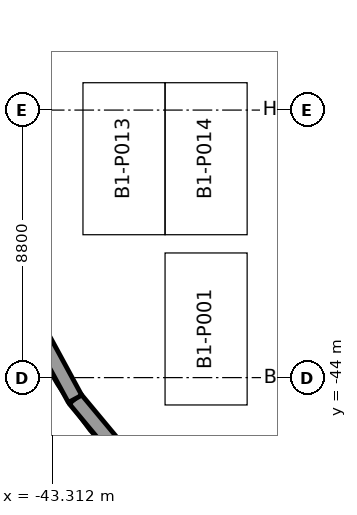
"""IFC4 building model, lengths in metres.
Left out: names, types, materials, properties, quantities, classifications, styles, units other than length and angle.
Written with IfcOpenShell. Run it as: python <this file> out.ifc"""

import sys

from ifc_helpers import new_model, si_unit, direction, frame, frame_2d, origin, place, context, subcontext, project, spatial, rectangle, extrude, element, save


model = new_model("IFC4")
c1 = context("Model", 3, precision=1e-05, world=origin(), true_north=direction((0.0, 1.0)))
c2 = subcontext(c1, "Body", "Model", "MODEL_VIEW")
j1 = project(units=[si_unit("LENGTHUNIT", "METRE"), si_unit("PLANEANGLEUNIT", "RADIAN")], contexts=[c1])
p1 = place(None, origin())
s1 = spatial("IfcSite", under=j1, at=p1, CompositionType="ELEMENT")
p2 = place(p1, origin())
s2 = spatial("IfcBuilding", under=s1, at=p2, CompositionType="ELEMENT")
p3 = place(p2, frame((0.0, 0.0, -4.5)))
s3 = spatial("IfcBuildingStorey", under=s2, at=p3, CompositionType="ELEMENT", Elevation=-4.5)
p4 = place(p3, frame((-40.853, -46.752, 0.0), z_axis=(0.0, 0.0, 1.0), x_axis=(-0.63937488944, 0.768895149388, 0.0)))
e1 = element("IfcWall", 1, at=p4, inside=s3, PredefinedType="SOLIDWALL", context=c2, shape_type="SweptSolid", body=[
    extrude(rectangle(XDim=2.671, YDim=0.5, at=frame_2d((1.335, 0.0))), origin(), (0.0, 0.0, 1.0), 4.5),
])
p5 = place(p3, frame((-42.561, -44.699, 0.0), z_axis=(0.0, 0.0, 1.0), x_axis=(-0.477048002242, 0.878877240323, 0.0)))
e2 = element("IfcWall", 2, at=p5, inside=s3, PredefinedType="SOLIDWALL", context=c2, shape_type="SweptSolid", body=[
    extrude(rectangle(XDim=4.791, YDim=0.5, at=frame_2d((2.396, 0.0))), origin(), (0.0, 0.0, 1.0), 4.5),
])
save(model, sys.argv[1])
